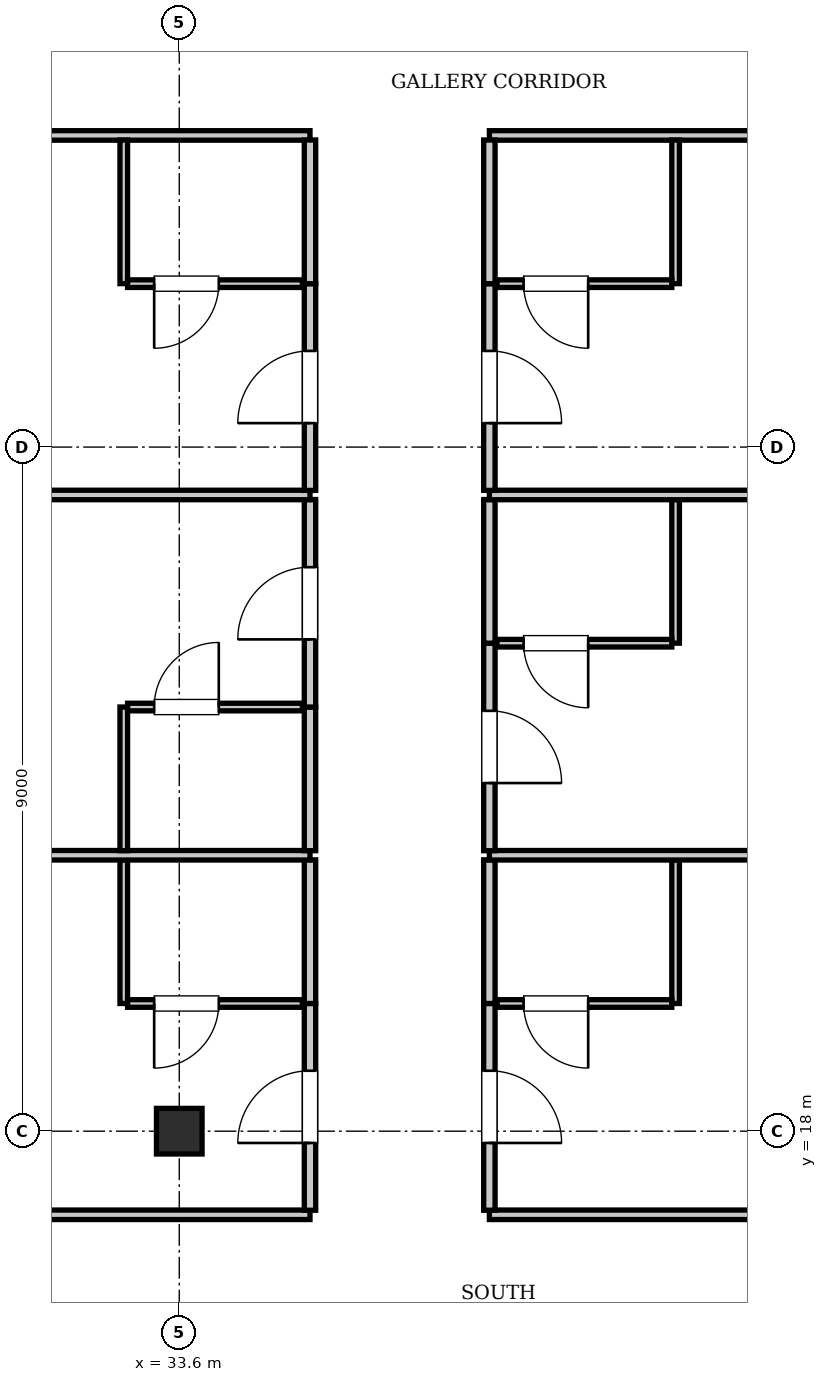
"""IFC4 building model, lengths in metres.
Left out: names, types, materials, properties, quantities, classifications, styles, units other than length and angle.
Written with IfcOpenShell. Run it as: python <this file> out.ifc"""

import sys

from ifc_helpers import new_model, si_unit, direction, frame, frame_2d, origin, origin_2d, place, context, subcontext, project, spatial, rectangle, i_section, extrude, element, fill, save


model = new_model("IFC4")
c1 = context("Model", 3, precision=1e-05, world=origin(), true_north=direction((0.0, 1.0)))
c2 = subcontext(c1, "Body", "Model", "MODEL_VIEW")
j1 = project(units=[si_unit("LENGTHUNIT", "METRE"), si_unit("PLANEANGLEUNIT", "RADIAN")], contexts=[c1])
p1 = place(None, origin())
s1 = spatial("IfcSite", under=j1, at=p1, CompositionType="ELEMENT")
p2 = place(p1, origin())
s2 = spatial("IfcBuilding", under=s1, at=p2, CompositionType="ELEMENT")
p3 = place(p2, frame((0.0, 0.0, 138.95)))
s3 = spatial("IfcBuildingStorey", under=s2, at=p3, CompositionType="ELEMENT", Elevation=138.95)
p4 = place(p3, frame((33.6, 18.0, 0.0), z_axis=(0.0, 0.0, 1.0), x_axis=(1.0, 0.0, 0.0)))
e1 = element("IfcColumn", 1, at=p4, inside=s3, PredefinedType="COLUMN", context=c2, shape_type="SweptSolid", body=[
    extrude(i_section(OverallWidth=0.6, OverallDepth=0.6, WebThickness=0.025, FlangeThickness=0.038, at=origin_2d()), origin(), (0.0, 0.0, 1.0), 3.85),
])
p5 = place(p3, frame((13.2, 16.9, 0.0), z_axis=(0.0, 0.0, 1.0), x_axis=(1.0, 0.0, 0.0)))
e2 = element("IfcWall", 2, at=p5, inside=s3, PredefinedType="PARTITIONING", context=c2, shape_type="SweptSolid", body=[
    extrude(rectangle(XDim=22.12, YDim=0.125, at=frame_2d((11.06, 0.0))), origin(), (0.0, 0.0, 1.0), 3.61),
])
p6 = place(p3, frame((37.68, 16.9, 0.0), z_axis=(0.0, 0.0, 1.0), x_axis=(1.0, 0.0, 0.0)))
e3 = element("IfcWall", 3, at=p6, inside=s3, PredefinedType="PARTITIONING", context=c2, shape_type="SweptSolid", body=[
    extrude(rectangle(XDim=24.72, YDim=0.125, at=frame_2d((12.36, 0.0))), origin(), (0.0, 0.0, 1.0), 3.61),
])
p7 = place(p3, frame((13.2, 31.1, 0.0), z_axis=(0.0, 0.0, 1.0), x_axis=(1.0, 0.0, 0.0)))
e4 = element("IfcWall", 4, at=p7, inside=s3, PredefinedType="PARTITIONING", context=c2, shape_type="SweptSolid", body=[
    extrude(rectangle(XDim=22.12, YDim=0.125, at=frame_2d((11.06, 0.0))), origin(), (0.0, 0.0, 1.0), 3.61),
])
p8 = place(p3, frame((37.68, 31.1, 0.0), z_axis=(0.0, 0.0, 1.0), x_axis=(1.0, 0.0, 0.0)))
e5 = element("IfcWall", 5, at=p8, inside=s3, PredefinedType="PARTITIONING", context=c2, shape_type="SweptSolid", body=[
    extrude(rectangle(XDim=24.72, YDim=0.125, at=frame_2d((12.36, 0.0))), origin(), (0.0, 0.0, 1.0), 3.61),
])
p9 = place(p3, frame((35.32, 16.96, 0.0), z_axis=(0.0, 0.0, 1.0), x_axis=(0.0, 1.0, 0.0)))
e6 = element("IfcWall", 6, at=p9, inside=s3, PredefinedType="PARTITIONING", context=c2, shape_type="SweptSolid", body=[
    extrude(rectangle(XDim=2.72, YDim=0.15, at=frame_2d((1.36, 0.0))), origin(), (0.0, 0.0, 1.0), 3.61),
])
p10 = place(p9, frame((0.885, 0.0, 0.0)))
e7 = element("IfcOpeningElement", 7, at=p10, cuts=e6, PredefinedType="OPENING", context=c2, shape_type="SweptSolid", body=[
    extrude(rectangle(XDim=0.95, YDim=2.15, at=frame_2d((0.475, 1.075))), frame((0.0, 0.085, 0.0), z_axis=(0.0, -1.0, 0.0), x_axis=(1.0, 0.0, 0.0)), (0.0, 0.0, 1.0), 0.17),
])
p11 = place(p3, frame((35.32, 19.68, 0.0), z_axis=(0.0, 0.0, 1.0), x_axis=(0.0, 1.0, 0.0)))
e8 = element("IfcWall", 8, at=p11, inside=s3, PredefinedType="PARTITIONING", context=c2, shape_type="SweptSolid", body=[
    extrude(rectangle(XDim=1.89, YDim=0.15, at=frame_2d((0.945, 0.0))), origin(), (0.0, 0.0, 1.0), 3.61),
])
p12 = place(p3, frame((32.87, 19.68, 0.0), z_axis=(0.0, 0.0, 1.0), x_axis=(0.0, 1.0, 0.0)))
e9 = element("IfcWall", 9, at=p12, inside=s3, PredefinedType="PARTITIONING", context=c2, shape_type="SweptSolid", body=[
    extrude(rectangle(XDim=1.89, YDim=0.1, at=frame_2d((0.945, 0.0))), origin(), (0.0, 0.0, 1.0), 3.61),
])
p13 = place(p3, frame((32.92, 19.68, 0.0), z_axis=(0.0, 0.0, 1.0), x_axis=(1.0, 0.0, 0.0)))
e10 = element("IfcWall", 10, at=p13, inside=s3, PredefinedType="PARTITIONING", context=c2, shape_type="SweptSolid", body=[
    extrude(rectangle(XDim=2.3, YDim=0.1, at=frame_2d((1.15, 0.0))), origin(), (0.0, 0.0, 1.0), 3.61),
])
p14 = place(p13, frame((0.35, 0.0, 0.0)))
e11 = element("IfcOpeningElement", 11, at=p14, cuts=e10, PredefinedType="OPENING", context=c2, shape_type="SweptSolid", body=[
    extrude(rectangle(XDim=0.85, YDim=2.1, at=frame_2d((0.425, 1.05))), frame((0.0, 0.06, 0.0), z_axis=(0.0, -1.0, 0.0), x_axis=(1.0, 0.0, 0.0)), (0.0, 0.0, 1.0), 0.12),
])
p15 = place(p3, frame((37.68, 16.96, 0.0), z_axis=(0.0, 0.0, 1.0), x_axis=(0.0, 1.0, 0.0)))
e12 = element("IfcWall", 12, at=p15, inside=s3, PredefinedType="PARTITIONING", context=c2, shape_type="SweptSolid", body=[
    extrude(rectangle(XDim=2.72, YDim=0.15, at=frame_2d((1.36, 0.0))), origin(), (0.0, 0.0, 1.0), 3.255),
])
p16 = place(p15, frame((0.885, 0.0, 0.0)))
e13 = element("IfcOpeningElement", 13, at=p16, cuts=e12, PredefinedType="OPENING", context=c2, shape_type="SweptSolid", body=[
    extrude(rectangle(XDim=0.95, YDim=2.15, at=frame_2d((0.475, 1.075))), frame((0.0, 0.085, 0.0), z_axis=(0.0, -1.0, 0.0), x_axis=(1.0, 0.0, 0.0)), (0.0, 0.0, 1.0), 0.17),
])
p17 = place(p3, frame((37.68, 19.68, 0.0), z_axis=(0.0, 0.0, 1.0), x_axis=(0.0, 1.0, 0.0)))
e14 = element("IfcWall", 14, at=p17, inside=s3, PredefinedType="PARTITIONING", context=c2, shape_type="SweptSolid", body=[
    extrude(rectangle(XDim=1.89, YDim=0.15, at=frame_2d((0.945, 0.0))), origin(), (0.0, 0.0, 1.0), 3.61),
])
p18 = place(p3, frame((40.13, 19.68, 0.0), z_axis=(0.0, 0.0, 1.0), x_axis=(0.0, 1.0, 0.0)))
e15 = element("IfcWall", 15, at=p18, inside=s3, PredefinedType="PARTITIONING", context=c2, shape_type="SweptSolid", body=[
    extrude(rectangle(XDim=1.89, YDim=0.1, at=frame_2d((0.945, 0.0))), origin(), (0.0, 0.0, 1.0), 3.61),
])
p19 = place(p3, frame((37.78, 19.68, 0.0), z_axis=(0.0, 0.0, 1.0), x_axis=(1.0, 0.0, 0.0)))
e16 = element("IfcWall", 16, at=p19, inside=s3, PredefinedType="PARTITIONING", context=c2, shape_type="SweptSolid", body=[
    extrude(rectangle(XDim=2.3, YDim=0.1, at=frame_2d((1.15, 0.0))), origin(), (0.0, 0.0, 1.0), 3.61),
])
p20 = place(p19, frame((0.35, 0.0, 0.0)))
e17 = element("IfcOpeningElement", 17, at=p20, cuts=e16, PredefinedType="OPENING", context=c2, shape_type="SweptSolid", body=[
    extrude(rectangle(XDim=0.85, YDim=2.1, at=frame_2d((0.425, 1.05))), frame((0.0, 0.06, 0.0), z_axis=(0.0, -1.0, 0.0), x_axis=(1.0, 0.0, 0.0)), (0.0, 0.0, 1.0), 0.12),
])
p21 = place(p3, frame((13.2, 21.63, 0.0), z_axis=(0.0, 0.0, 1.0), x_axis=(1.0, 0.0, 0.0)))
e18 = element("IfcWall", 18, at=p21, inside=s3, PredefinedType="PARTITIONING", context=c2, shape_type="SweptSolid", body=[
    extrude(rectangle(XDim=22.12, YDim=0.125, at=frame_2d((11.06, 0.0))), origin(), (0.0, 0.0, 1.0), 3.61),
])
p22 = place(p3, frame((37.68, 21.63, 0.0), z_axis=(0.0, 0.0, 1.0), x_axis=(1.0, 0.0, 0.0)))
e19 = element("IfcWall", 19, at=p22, inside=s3, PredefinedType="PARTITIONING", context=c2, shape_type="SweptSolid", body=[
    extrude(rectangle(XDim=24.72, YDim=0.125, at=frame_2d((12.36, 0.0))), origin(), (0.0, 0.0, 1.0), 3.61),
])
p23 = place(p3, frame((35.32, 21.69, 0.0), z_axis=(0.0, 0.0, 1.0), x_axis=(0.0, 1.0, 0.0)))
e20 = element("IfcWall", 20, at=p23, inside=s3, PredefinedType="PARTITIONING", context=c2, shape_type="SweptSolid", body=[
    extrude(rectangle(XDim=1.89, YDim=0.15, at=frame_2d((0.945, 0.0))), origin(), (0.0, 0.0, 1.0), 3.61),
])
p24 = place(p3, frame((35.32, 23.58, 0.0), z_axis=(0.0, 0.0, 1.0), x_axis=(0.0, 1.0, 0.0)))
e21 = element("IfcWall", 21, at=p24, inside=s3, PredefinedType="PARTITIONING", context=c2, shape_type="SweptSolid", body=[
    extrude(rectangle(XDim=2.73, YDim=0.15, at=frame_2d((1.365, 0.0))), origin(), (0.0, 0.0, 1.0), 3.61),
])
p25 = place(p24, frame((0.89, 0.0, 0.0)))
e22 = element("IfcOpeningElement", 22, at=p25, cuts=e21, PredefinedType="OPENING", context=c2, shape_type="SweptSolid", body=[
    extrude(rectangle(XDim=0.95, YDim=2.15, at=frame_2d((0.475, 1.075))), frame((0.0, 0.085, 0.0), z_axis=(0.0, -1.0, 0.0), x_axis=(1.0, 0.0, 0.0)), (0.0, 0.0, 1.0), 0.17),
])
p26 = place(p3, frame((32.87, 21.69, 0.0), z_axis=(0.0, 0.0, 1.0), x_axis=(0.0, 1.0, 0.0)))
e23 = element("IfcWall", 23, at=p26, inside=s3, PredefinedType="PARTITIONING", context=c2, shape_type="SweptSolid", body=[
    extrude(rectangle(XDim=1.89, YDim=0.1, at=frame_2d((0.945, 0.0))), origin(), (0.0, 0.0, 1.0), 3.61),
])
p27 = place(p3, frame((32.92, 23.58, 0.0), z_axis=(0.0, 0.0, 1.0), x_axis=(1.0, 0.0, 0.0)))
e24 = element("IfcWall", 24, at=p27, inside=s3, PredefinedType="PARTITIONING", context=c2, shape_type="SweptSolid", body=[
    extrude(rectangle(XDim=2.3, YDim=0.1, at=frame_2d((1.15, 0.0))), origin(), (0.0, 0.0, 1.0), 3.61),
])
p28 = place(p27, frame((0.35, 0.0, 0.0)))
e25 = element("IfcOpeningElement", 25, at=p28, cuts=e24, PredefinedType="OPENING", context=c2, shape_type="SweptSolid", body=[
    extrude(rectangle(XDim=0.85, YDim=2.1, at=frame_2d((0.425, 1.05))), frame((0.0, 0.06, 0.0), z_axis=(0.0, -1.0, 0.0), x_axis=(1.0, 0.0, 0.0)), (0.0, 0.0, 1.0), 0.12),
])
p29 = place(p3, frame((37.68, 21.69, 0.0), z_axis=(0.0, 0.0, 1.0), x_axis=(0.0, 1.0, 0.0)))
e26 = element("IfcWall", 26, at=p29, inside=s3, PredefinedType="PARTITIONING", context=c2, shape_type="SweptSolid", body=[
    extrude(rectangle(XDim=2.73, YDim=0.15, at=frame_2d((1.365, 0.0))), origin(), (0.0, 0.0, 1.0), 3.61),
])
p30 = place(p29, frame((0.89, 0.0, 0.0)))
e27 = element("IfcOpeningElement", 27, at=p30, cuts=e26, PredefinedType="OPENING", context=c2, shape_type="SweptSolid", body=[
    extrude(rectangle(XDim=0.95, YDim=2.15, at=frame_2d((0.475, 1.075))), frame((0.0, 0.085, 0.0), z_axis=(0.0, -1.0, 0.0), x_axis=(1.0, 0.0, 0.0)), (0.0, 0.0, 1.0), 0.17),
])
p31 = place(p3, frame((37.68, 24.42, 0.0), z_axis=(0.0, 0.0, 1.0), x_axis=(0.0, 1.0, 0.0)))
e28 = element("IfcWall", 28, at=p31, inside=s3, PredefinedType="PARTITIONING", context=c2, shape_type="SweptSolid", body=[
    extrude(rectangle(XDim=1.89, YDim=0.15, at=frame_2d((0.945, 0.0))), origin(), (0.0, 0.0, 1.0), 3.61),
])
p32 = place(p3, frame((40.13, 24.42, 0.0), z_axis=(0.0, 0.0, 1.0), x_axis=(0.0, 1.0, 0.0)))
e29 = element("IfcWall", 29, at=p32, inside=s3, PredefinedType="PARTITIONING", context=c2, shape_type="SweptSolid", body=[
    extrude(rectangle(XDim=1.89, YDim=0.1, at=frame_2d((0.945, 0.0))), origin(), (0.0, 0.0, 1.0), 3.61),
])
p33 = place(p3, frame((37.78, 24.42, 0.0), z_axis=(0.0, 0.0, 1.0), x_axis=(1.0, 0.0, 0.0)))
e30 = element("IfcWall", 30, at=p33, inside=s3, PredefinedType="PARTITIONING", context=c2, shape_type="SweptSolid", body=[
    extrude(rectangle(XDim=2.3, YDim=0.1, at=frame_2d((1.15, 0.0))), origin(), (0.0, 0.0, 1.0), 3.61),
])
p34 = place(p33, frame((0.35, 0.0, 0.0)))
e31 = element("IfcOpeningElement", 31, at=p34, cuts=e30, PredefinedType="OPENING", context=c2, shape_type="SweptSolid", body=[
    extrude(rectangle(XDim=0.85, YDim=2.1, at=frame_2d((0.425, 1.05))), frame((0.0, 0.06, 0.0), z_axis=(0.0, -1.0, 0.0), x_axis=(1.0, 0.0, 0.0)), (0.0, 0.0, 1.0), 0.12),
])
p35 = place(p3, frame((13.2, 26.37, 0.0), z_axis=(0.0, 0.0, 1.0), x_axis=(1.0, 0.0, 0.0)))
e32 = element("IfcWall", 32, at=p35, inside=s3, PredefinedType="PARTITIONING", context=c2, shape_type="SweptSolid", body=[
    extrude(rectangle(XDim=22.12, YDim=0.125, at=frame_2d((11.06, 0.0))), origin(), (0.0, 0.0, 1.0), 3.61),
])
p36 = place(p3, frame((37.68, 26.37, 0.0), z_axis=(0.0, 0.0, 1.0), x_axis=(1.0, 0.0, 0.0)))
e33 = element("IfcWall", 33, at=p36, inside=s3, PredefinedType="PARTITIONING", context=c2, shape_type="SweptSolid", body=[
    extrude(rectangle(XDim=24.72, YDim=0.125, at=frame_2d((12.36, 0.0))), origin(), (0.0, 0.0, 1.0), 3.61),
])
p37 = place(p3, frame((35.32, 26.43, 0.0), z_axis=(0.0, 0.0, 1.0), x_axis=(0.0, 1.0, 0.0)))
e34 = element("IfcWall", 34, at=p37, inside=s3, PredefinedType="PARTITIONING", context=c2, shape_type="SweptSolid", body=[
    extrude(rectangle(XDim=2.72, YDim=0.15, at=frame_2d((1.36, 0.0))), origin(), (0.0, 0.0, 1.0), 3.61),
])
p38 = place(p37, frame((0.885, 0.0, 0.0)))
e35 = element("IfcOpeningElement", 35, at=p38, cuts=e34, PredefinedType="OPENING", context=c2, shape_type="SweptSolid", body=[
    extrude(rectangle(XDim=0.95, YDim=2.15, at=frame_2d((0.475, 1.075))), frame((0.0, 0.085, 0.0), z_axis=(0.0, -1.0, 0.0), x_axis=(1.0, 0.0, 0.0)), (0.0, 0.0, 1.0), 0.17),
])
p39 = place(p3, frame((35.32, 29.15, 0.0), z_axis=(0.0, 0.0, 1.0), x_axis=(0.0, 1.0, 0.0)))
e36 = element("IfcWall", 36, at=p39, inside=s3, PredefinedType="PARTITIONING", context=c2, shape_type="SweptSolid", body=[
    extrude(rectangle(XDim=1.89, YDim=0.15, at=frame_2d((0.945, 0.0))), origin(), (0.0, 0.0, 1.0), 3.61),
])
p40 = place(p3, frame((32.87, 29.15, 0.0), z_axis=(0.0, 0.0, 1.0), x_axis=(0.0, 1.0, 0.0)))
e37 = element("IfcWall", 37, at=p40, inside=s3, PredefinedType="PARTITIONING", context=c2, shape_type="SweptSolid", body=[
    extrude(rectangle(XDim=1.89, YDim=0.1, at=frame_2d((0.945, 0.0))), origin(), (0.0, 0.0, 1.0), 3.61),
])
p41 = place(p3, frame((32.92, 29.15, 0.0), z_axis=(0.0, 0.0, 1.0), x_axis=(1.0, 0.0, 0.0)))
e38 = element("IfcWall", 38, at=p41, inside=s3, PredefinedType="PARTITIONING", context=c2, shape_type="SweptSolid", body=[
    extrude(rectangle(XDim=2.3, YDim=0.1, at=frame_2d((1.15, 0.0))), origin(), (0.0, 0.0, 1.0), 3.61),
])
p42 = place(p41, frame((0.35, 0.0, 0.0)))
e39 = element("IfcOpeningElement", 39, at=p42, cuts=e38, PredefinedType="OPENING", context=c2, shape_type="SweptSolid", body=[
    extrude(rectangle(XDim=0.85, YDim=2.1, at=frame_2d((0.425, 1.05))), frame((0.0, 0.06, 0.0), z_axis=(0.0, -1.0, 0.0), x_axis=(1.0, 0.0, 0.0)), (0.0, 0.0, 1.0), 0.12),
])
p43 = place(p3, frame((37.68, 26.43, 0.0), z_axis=(0.0, 0.0, 1.0), x_axis=(0.0, 1.0, 0.0)))
e40 = element("IfcWall", 40, at=p43, inside=s3, PredefinedType="PARTITIONING", context=c2, shape_type="SweptSolid", body=[
    extrude(rectangle(XDim=2.72, YDim=0.15, at=frame_2d((1.36, 0.0))), origin(), (0.0, 0.0, 1.0), 3.61),
])
p44 = place(p43, frame((0.885, 0.0, 0.0)))
e41 = element("IfcOpeningElement", 41, at=p44, cuts=e40, PredefinedType="OPENING", context=c2, shape_type="SweptSolid", body=[
    extrude(rectangle(XDim=0.95, YDim=2.15, at=frame_2d((0.475, 1.075))), frame((0.0, 0.085, 0.0), z_axis=(0.0, -1.0, 0.0), x_axis=(1.0, 0.0, 0.0)), (0.0, 0.0, 1.0), 0.17),
])
p45 = place(p3, frame((37.68, 29.15, 0.0), z_axis=(0.0, 0.0, 1.0), x_axis=(0.0, 1.0, 0.0)))
e42 = element("IfcWall", 42, at=p45, inside=s3, PredefinedType="PARTITIONING", context=c2, shape_type="SweptSolid", body=[
    extrude(rectangle(XDim=1.89, YDim=0.15, at=frame_2d((0.945, 0.0))), origin(), (0.0, 0.0, 1.0), 3.61),
])
p46 = place(p3, frame((40.13, 29.15, 0.0), z_axis=(0.0, 0.0, 1.0), x_axis=(0.0, 1.0, 0.0)))
e43 = element("IfcWall", 43, at=p46, inside=s3, PredefinedType="PARTITIONING", context=c2, shape_type="SweptSolid", body=[
    extrude(rectangle(XDim=1.89, YDim=0.1, at=frame_2d((0.945, 0.0))), origin(), (0.0, 0.0, 1.0), 3.61),
])
p47 = place(p3, frame((37.78, 29.15, 0.0), z_axis=(0.0, 0.0, 1.0), x_axis=(1.0, 0.0, 0.0)))
e44 = element("IfcWall", 44, at=p47, inside=s3, PredefinedType="PARTITIONING", context=c2, shape_type="SweptSolid", body=[
    extrude(rectangle(XDim=2.3, YDim=0.1, at=frame_2d((1.15, 0.0))), origin(), (0.0, 0.0, 1.0), 3.61),
])
p48 = place(p47, frame((0.35, 0.0, 0.0)))
e45 = element("IfcOpeningElement", 45, at=p48, cuts=e44, PredefinedType="OPENING", context=c2, shape_type="SweptSolid", body=[
    extrude(rectangle(XDim=0.85, YDim=2.1, at=frame_2d((0.425, 1.05))), frame((0.0, 0.06, 0.0), z_axis=(0.0, -1.0, 0.0), x_axis=(1.0, 0.0, 0.0)), (0.0, 0.0, 1.0), 0.12),
])
p49 = place(p14, frame((0.85, 0.0, 0.0), z_axis=(0.0, 0.0, 1.0), x_axis=(-1.0, 0.0, 0.0)))
e46 = element("IfcDoor", 46, at=p49, inside=s3, OperationType="SINGLE_SWING_RIGHT", PredefinedType="DOOR", context=c2, shape_type="SweptSolid", body=[
    extrude(rectangle(XDim=0.85, YDim=2.1, at=frame_2d((0.425, 1.05))), frame((0.0, 0.025, 0.0), z_axis=(0.0, -1.0, 0.0), x_axis=(1.0, 0.0, 0.0)), (0.0, 0.0, 1.0), 0.05),
])
fill(e11, e46)
p50 = place(p10, origin())
e47 = element("IfcDoor", 47, at=p50, inside=s3, OperationType="SINGLE_SWING_LEFT", PredefinedType="DOOR", context=c2, shape_type="SweptSolid", body=[
    extrude(rectangle(XDim=0.95, YDim=2.15, at=frame_2d((0.475, 1.075))), frame((0.0, 0.025, 0.0), z_axis=(0.0, -1.0, 0.0), x_axis=(1.0, 0.0, 0.0)), (0.0, 0.0, 1.0), 0.05),
])
fill(e7, e47)
p51 = place(p20, frame((0.85, 0.0, 0.0), z_axis=(0.0, 0.0, 1.0), x_axis=(-1.0, 0.0, 0.0)))
e48 = element("IfcDoor", 48, at=p51, inside=s3, OperationType="SINGLE_SWING_LEFT", PredefinedType="DOOR", context=c2, shape_type="SweptSolid", body=[
    extrude(rectangle(XDim=0.85, YDim=2.1, at=frame_2d((0.425, 1.05))), frame((0.0, 0.025, 0.0), z_axis=(0.0, -1.0, 0.0), x_axis=(1.0, 0.0, 0.0)), (0.0, 0.0, 1.0), 0.05),
])
fill(e17, e48)
p52 = place(p16, frame((0.95, 0.0, 0.0), z_axis=(0.0, 0.0, 1.0), x_axis=(-1.0, 0.0, 0.0)))
e49 = element("IfcDoor", 49, at=p52, inside=s3, OperationType="SINGLE_SWING_RIGHT", PredefinedType="DOOR", context=c2, shape_type="SweptSolid", body=[
    extrude(rectangle(XDim=0.95, YDim=2.15, at=frame_2d((0.475, 1.075))), frame((0.0, 0.025, 0.0), z_axis=(0.0, -1.0, 0.0), x_axis=(1.0, 0.0, 0.0)), (0.0, 0.0, 1.0), 0.05),
])
fill(e13, e49)
p53 = place(p28, origin())
e50 = element("IfcDoor", 50, at=p53, inside=s3, OperationType="SINGLE_SWING_RIGHT", PredefinedType="DOOR", context=c2, shape_type="SweptSolid", body=[
    extrude(rectangle(XDim=0.85, YDim=2.1, at=frame_2d((0.425, 1.05))), frame((0.0, 0.025, 0.0), z_axis=(0.0, -1.0, 0.0), x_axis=(1.0, 0.0, 0.0)), (0.0, 0.0, 1.0), 0.05),
])
fill(e25, e50)
p54 = place(p25, origin())
e51 = element("IfcDoor", 51, at=p54, inside=s3, OperationType="SINGLE_SWING_LEFT", PredefinedType="DOOR", context=c2, shape_type="SweptSolid", body=[
    extrude(rectangle(XDim=0.95, YDim=2.15, at=frame_2d((0.475, 1.075))), frame((0.0, 0.025, 0.0), z_axis=(0.0, -1.0, 0.0), x_axis=(1.0, 0.0, 0.0)), (0.0, 0.0, 1.0), 0.05),
])
fill(e22, e51)
p55 = place(p34, frame((0.85, 0.0, 0.0), z_axis=(0.0, 0.0, 1.0), x_axis=(-1.0, 0.0, 0.0)))
e52 = element("IfcDoor", 52, at=p55, inside=s3, OperationType="SINGLE_SWING_LEFT", PredefinedType="DOOR", context=c2, shape_type="SweptSolid", body=[
    extrude(rectangle(XDim=0.85, YDim=2.1, at=frame_2d((0.425, 1.05))), frame((0.0, 0.025, 0.0), z_axis=(0.0, -1.0, 0.0), x_axis=(1.0, 0.0, 0.0)), (0.0, 0.0, 1.0), 0.05),
])
fill(e31, e52)
p56 = place(p30, frame((0.95, 0.0, 0.0), z_axis=(0.0, 0.0, 1.0), x_axis=(-1.0, 0.0, 0.0)))
e53 = element("IfcDoor", 53, at=p56, inside=s3, OperationType="SINGLE_SWING_RIGHT", PredefinedType="DOOR", context=c2, shape_type="SweptSolid", body=[
    extrude(rectangle(XDim=0.95, YDim=2.15, at=frame_2d((0.475, 1.075))), frame((0.0, 0.025, 0.0), z_axis=(0.0, -1.0, 0.0), x_axis=(1.0, 0.0, 0.0)), (0.0, 0.0, 1.0), 0.05),
])
fill(e27, e53)
p57 = place(p42, frame((0.85, 0.0, 0.0), z_axis=(0.0, 0.0, 1.0), x_axis=(-1.0, 0.0, 0.0)))
e54 = element("IfcDoor", 54, at=p57, inside=s3, OperationType="SINGLE_SWING_RIGHT", PredefinedType="DOOR", context=c2, shape_type="SweptSolid", body=[
    extrude(rectangle(XDim=0.85, YDim=2.1, at=frame_2d((0.425, 1.05))), frame((0.0, 0.025, 0.0), z_axis=(0.0, -1.0, 0.0), x_axis=(1.0, 0.0, 0.0)), (0.0, 0.0, 1.0), 0.05),
])
fill(e39, e54)
p58 = place(p38, origin())
e55 = element("IfcDoor", 55, at=p58, inside=s3, OperationType="SINGLE_SWING_LEFT", PredefinedType="DOOR", context=c2, shape_type="SweptSolid", body=[
    extrude(rectangle(XDim=0.95, YDim=2.15, at=frame_2d((0.475, 1.075))), frame((0.0, 0.025, 0.0), z_axis=(0.0, -1.0, 0.0), x_axis=(1.0, 0.0, 0.0)), (0.0, 0.0, 1.0), 0.05),
])
fill(e35, e55)
p59 = place(p48, frame((0.85, 0.0, 0.0), z_axis=(0.0, 0.0, 1.0), x_axis=(-1.0, 0.0, 0.0)))
e56 = element("IfcDoor", 56, at=p59, inside=s3, OperationType="SINGLE_SWING_LEFT", PredefinedType="DOOR", context=c2, shape_type="SweptSolid", body=[
    extrude(rectangle(XDim=0.85, YDim=2.1, at=frame_2d((0.425, 1.05))), frame((0.0, 0.025, 0.0), z_axis=(0.0, -1.0, 0.0), x_axis=(1.0, 0.0, 0.0)), (0.0, 0.0, 1.0), 0.05),
])
fill(e45, e56)
p60 = place(p44, frame((0.95, 0.0, 0.0), z_axis=(0.0, 0.0, 1.0), x_axis=(-1.0, 0.0, 0.0)))
e57 = element("IfcDoor", 57, at=p60, inside=s3, OperationType="SINGLE_SWING_RIGHT", PredefinedType="DOOR", context=c2, shape_type="SweptSolid", body=[
    extrude(rectangle(XDim=0.95, YDim=2.15, at=frame_2d((0.475, 1.075))), frame((0.0, 0.025, 0.0), z_axis=(0.0, -1.0, 0.0), x_axis=(1.0, 0.0, 0.0)), (0.0, 0.0, 1.0), 0.05),
])
fill(e41, e57)
save(model, sys.argv[1])
